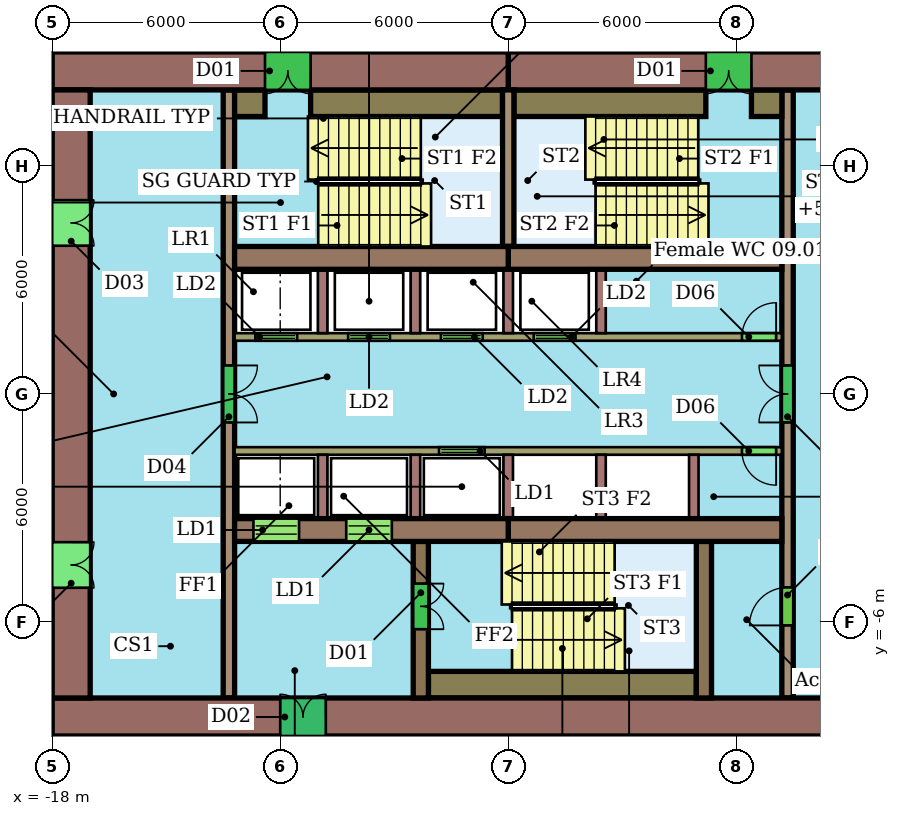
"""IFC4 building model, lengths in metres.
Left out: names, types, materials, properties, quantities, classifications, styles, units other than length and angle.
Written with IfcOpenShell. Run it as: python <this file> out.ifc"""

import sys

from ifc_helpers import new_model, si_unit, direction, frame, frame_2d, origin, place, context, subcontext, project, spatial, rectangle, extrude, element, fill, save


model = new_model("IFC4")
c1 = context("Model", 3, precision=1e-05, world=origin(), true_north=direction((0.0, 1.0)))
c2 = subcontext(c1, "Body", "Model", "MODEL_VIEW")
j1 = project(units=[si_unit("LENGTHUNIT", "METRE"), si_unit("PLANEANGLEUNIT", "RADIAN")], contexts=[c1])
p1 = place(None, origin())
s1 = spatial("IfcSite", under=j1, at=p1, CompositionType="ELEMENT")
p2 = place(p1, origin())
s2 = spatial("IfcBuilding", under=s1, at=p2, CompositionType="ELEMENT")
p3 = place(p2, frame((0.0, 0.0, 50.8)))
s3 = spatial("IfcBuildingStorey", under=s2, at=p3, CompositionType="ELEMENT", Elevation=50.8)
p4 = place(p3, frame((6.0, 8.5, 0.0), z_axis=(0.0, 0.0, 1.0), x_axis=(-1.0, 0.0, 0.0)))
e1 = element("IfcWall", 1, at=p4, inside=s3, PredefinedType="SHEAR", context=c2, shape_type="SweptSolid", body=[
    extrude(rectangle(XDim=12.0, YDim=1.0, at=frame_2d((6.0, 0.0))), origin(), (0.0, 0.0, 1.0), 3.4),
])
p5 = place(p4, frame((5.6, 0.0, 0.0)))
e2 = element("IfcOpeningElement", 2, at=p5, cuts=e1, PredefinedType="OPENING", context=c2, shape_type="SweptSolid", body=[
    extrude(rectangle(XDim=1.2, YDim=2.1, at=frame_2d((0.6, 1.05))), frame((0.0, 0.51, 0.0), z_axis=(0.0, -1.0, 0.0), x_axis=(1.0, 0.0, 0.0)), (0.0, 0.0, 1.0), 1.02),
])
p6 = place(p3, frame((-6.0, 8.5, 0.0), z_axis=(0.0, 0.0, 1.0), x_axis=(-1.0, 0.0, 0.0)))
e3 = element("IfcWall", 3, at=p6, inside=s3, PredefinedType="SHEAR", context=c2, shape_type="SweptSolid", body=[
    extrude(rectangle(XDim=12.0, YDim=1.0, at=frame_2d((6.0, 0.0))), origin(), (0.0, 0.0, 1.0), 3.4),
])
p7 = place(p6, frame((5.2, 0.0, 0.0)))
e4 = element("IfcOpeningElement", 4, at=p7, cuts=e3, PredefinedType="OPENING", context=c2, shape_type="SweptSolid", body=[
    extrude(rectangle(XDim=1.2, YDim=2.1, at=frame_2d((0.6, 1.05))), frame((0.0, 0.51, 0.0), z_axis=(0.0, -1.0, 0.0), x_axis=(1.0, 0.0, 0.0)), (0.0, 0.0, 1.0), 1.02),
])
p8 = place(p3, frame((-18.0, -8.5, 0.0), z_axis=(0.0, 0.0, 1.0), x_axis=(1.0, 0.0, 0.0)))
e5 = element("IfcWall", 5, at=p8, inside=s3, PredefinedType="SHEAR", context=c2, shape_type="SweptSolid", body=[
    extrude(rectangle(XDim=24.0, YDim=1.0, at=frame_2d((12.0, 0.0))), origin(), (0.0, 0.0, 1.0), 3.4),
])
p9 = place(p8, frame((6.0, 0.0, 0.0)))
e6 = element("IfcOpeningElement", 6, at=p9, cuts=e5, PredefinedType="OPENING", context=c2, shape_type="SweptSolid", body=[
    extrude(rectangle(XDim=1.2, YDim=2.1, at=frame_2d((0.6, 1.05))), frame((0.0, 0.51, 0.0), z_axis=(0.0, -1.0, 0.0), x_axis=(1.0, 0.0, 0.0)), (0.0, 0.0, 1.0), 1.02),
])
p10 = place(p3, frame((-17.5, 8.0, 0.0), z_axis=(0.0, 0.0, 1.0), x_axis=(0.0, -1.0, 0.0)))
e7 = element("IfcWall", 7, at=p10, inside=s3, PredefinedType="SHEAR", context=c2, shape_type="SweptSolid", body=[
    extrude(rectangle(XDim=16.0, YDim=1.0, at=frame_2d((8.0, 0.0))), origin(), (0.0, 0.0, 1.0), 3.4),
])
p11 = place(p10, frame((11.9, 0.0, 0.0)))
e8 = element("IfcOpeningElement", 8, at=p11, cuts=e7, PredefinedType="OPENING", context=c2, shape_type="SweptSolid", body=[
    extrude(rectangle(XDim=1.2, YDim=2.1, at=frame_2d((0.6, 1.05))), frame((0.0, 0.51, 0.0), z_axis=(0.0, -1.0, 0.0), x_axis=(1.0, 0.0, 0.0)), (0.0, 0.0, 1.0), 1.02),
])
p12 = place(p10, frame((2.9, 0.0, 0.0)))
e9 = element("IfcOpeningElement", 9, at=p12, cuts=e7, PredefinedType="OPENING", context=c2, shape_type="SweptSolid", body=[
    extrude(rectangle(XDim=1.2, YDim=2.1, at=frame_2d((0.6, 1.05))), frame((0.0, 0.51, 0.0), z_axis=(0.0, -1.0, 0.0), x_axis=(1.0, 0.0, 0.0)), (0.0, 0.0, 1.0), 1.02),
])
for number, where, z_axis, x_axis in (
    (10, (-13.2, 3.58, 0.0), (0.0, 0.0, 1.0), (1.0, 0.0, 0.0)),
    (11, (-6.0, 3.58, 0.0), (0.0, 0.0, 1.0), (1.0, 0.0, 0.0)),
):
    element("IfcWall", number, at=place(p3, frame(where, z_axis=z_axis, x_axis=x_axis)), inside=s3, PredefinedType="SHEAR", context=c2, shape_type="SweptSolid", body=[
        extrude(rectangle(XDim=7.2, YDim=0.6, at=frame_2d((3.6, 0.0))), origin(), (0.0, 0.0, 1.0), 3.4),
    ])
p13 = place(p3, frame((-13.2, -3.58, 0.0), z_axis=(0.0, 0.0, 1.0), x_axis=(1.0, 0.0, 0.0)))
e12 = element("IfcWall", 12, at=p13, inside=s3, PredefinedType="SHEAR", context=c2, shape_type="SweptSolid", body=[
    extrude(rectangle(XDim=7.2, YDim=0.6, at=frame_2d((3.6, 0.0))), origin(), (0.0, 0.0, 1.0), 3.4),
])
p14 = place(p13, frame((0.496, 0.0, 0.0)))
e13 = element("IfcOpeningElement", 13, at=p14, cuts=e12, PredefinedType="OPENING", context=c2, shape_type="SweptSolid", body=[
    extrude(rectangle(XDim=1.2, YDim=2.1, at=frame_2d((0.6, 1.05))), frame((0.0, 0.31, 0.0), z_axis=(0.0, -1.0, 0.0), x_axis=(1.0, 0.0, 0.0)), (0.0, 0.0, 1.0), 0.62),
])
p15 = place(p13, frame((2.938, 0.0, 0.0)))
e14 = element("IfcOpeningElement", 14, at=p15, cuts=e12, PredefinedType="OPENING", context=c2, shape_type="SweptSolid", body=[
    extrude(rectangle(XDim=1.2, YDim=2.1, at=frame_2d((0.6, 1.05))), frame((0.0, 0.31, 0.0), z_axis=(0.0, -1.0, 0.0), x_axis=(1.0, 0.0, 0.0)), (0.0, 0.0, 1.0), 0.62),
])
p16 = place(p3, frame((-6.0, -3.58, 0.0), z_axis=(0.0, 0.0, 1.0), x_axis=(1.0, 0.0, 0.0)))
e15 = element("IfcWall", 15, at=p16, inside=s3, PredefinedType="SHEAR", context=c2, shape_type="SweptSolid", body=[
    extrude(rectangle(XDim=7.2, YDim=0.6, at=frame_2d((3.6, 0.0))), origin(), (0.0, 0.0, 1.0), 3.4),
])
p17 = place(p3, frame((-13.35, 8.0, 0.0), z_axis=(0.0, 0.0, 1.0), x_axis=(0.0, -1.0, 0.0)))
e16 = element("IfcWall", 16, at=p17, inside=s3, PredefinedType="SHEAR", context=c2, shape_type="SweptSolid", body=[
    extrude(rectangle(XDim=16.0, YDim=0.3, at=frame_2d((8.0, 0.0))), origin(), (0.0, 0.0, 1.0), 3.4),
])
p18 = place(p17, frame((7.25, 0.0, 0.0)))
e17 = element("IfcOpeningElement", 17, at=p18, cuts=e16, PredefinedType="OPENING", context=c2, shape_type="SweptSolid", body=[
    extrude(rectangle(XDim=1.5, YDim=2.1, at=frame_2d((0.75, 1.05))), frame((0.0, 0.16, 0.0), z_axis=(0.0, -1.0, 0.0), x_axis=(1.0, 0.0, 0.0)), (0.0, 0.0, 1.0), 0.32),
])
p19 = place(p3, frame((1.35, -8.0, 0.0), z_axis=(0.0, 0.0, 1.0), x_axis=(0.0, 1.0, 0.0)))
e18 = element("IfcWall", 18, at=p19, inside=s3, PredefinedType="SHEAR", context=c2, shape_type="SweptSolid", body=[
    extrude(rectangle(XDim=16.0, YDim=0.3, at=frame_2d((8.0, 0.0))), origin(), (0.0, 0.0, 1.0), 3.4),
])
p20 = place(p19, frame((1.91, 0.0, 0.0)))
e19 = element("IfcOpeningElement", 19, at=p20, cuts=e18, PredefinedType="OPENING", context=c2, shape_type="SweptSolid", body=[
    extrude(rectangle(XDim=1.0, YDim=2.1, at=frame_2d((0.5, 1.05))), frame((0.0, 0.16, 0.0), z_axis=(0.0, -1.0, 0.0), x_axis=(1.0, 0.0, 0.0)), (0.0, 0.0, 1.0), 0.32),
])
p21 = place(p19, frame((7.25, 0.0, 0.0)))
e20 = element("IfcOpeningElement", 20, at=p21, cuts=e18, PredefinedType="OPENING", context=c2, shape_type="SweptSolid", body=[
    extrude(rectangle(XDim=1.5, YDim=2.1, at=frame_2d((0.75, 1.05))), frame((0.0, 0.16, 0.0), z_axis=(0.0, -1.0, 0.0), x_axis=(1.0, 0.0, 0.0)), (0.0, 0.0, 1.0), 0.32),
])
p22 = place(p3, frame((-13.2, 1.5, 0.0), z_axis=(0.0, 0.0, 1.0), x_axis=(1.0, 0.0, 0.0)))
e21 = element("IfcWall", 21, at=p22, inside=s3, PredefinedType="SHEAR", context=c2, shape_type="SweptSolid", body=[
    extrude(rectangle(XDim=14.4, YDim=0.2, at=frame_2d((7.2, 0.0))), origin(), (0.0, 0.0, 1.0), 3.4),
])
p23 = place(p22, frame((0.546, 0.0, 0.0)))
e22 = element("IfcOpeningElement", 22, at=p23, cuts=e21, PredefinedType="OPENING", context=c2, shape_type="SweptSolid", body=[
    extrude(rectangle(XDim=1.1, YDim=2.1, at=frame_2d((0.55, 1.05))), frame((0.0, 0.11, 0.0), z_axis=(0.0, -1.0, 0.0), x_axis=(1.0, 0.0, 0.0)), (0.0, 0.0, 1.0), 0.22),
])
p24 = place(p22, frame((2.988, 0.0, 0.0)))
e23 = element("IfcOpeningElement", 23, at=p24, cuts=e21, PredefinedType="OPENING", context=c2, shape_type="SweptSolid", body=[
    extrude(rectangle(XDim=1.1, YDim=2.1, at=frame_2d((0.55, 1.05))), frame((0.0, 0.11, 0.0), z_axis=(0.0, -1.0, 0.0), x_axis=(1.0, 0.0, 0.0)), (0.0, 0.0, 1.0), 0.22),
])
p25 = place(p22, frame((5.429, 0.0, 0.0)))
e24 = element("IfcOpeningElement", 24, at=p25, cuts=e21, PredefinedType="OPENING", context=c2, shape_type="SweptSolid", body=[
    extrude(rectangle(XDim=1.1, YDim=2.1, at=frame_2d((0.55, 1.05))), frame((0.0, 0.11, 0.0), z_axis=(0.0, -1.0, 0.0), x_axis=(1.0, 0.0, 0.0)), (0.0, 0.0, 1.0), 0.22),
])
p26 = place(p22, frame((7.871, 0.0, 0.0)))
e25 = element("IfcOpeningElement", 25, at=p26, cuts=e21, PredefinedType="OPENING", context=c2, shape_type="SweptSolid", body=[
    extrude(rectangle(XDim=1.1, YDim=2.1, at=frame_2d((0.55, 1.05))), frame((0.0, 0.11, 0.0), z_axis=(0.0, -1.0, 0.0), x_axis=(1.0, 0.0, 0.0)), (0.0, 0.0, 1.0), 0.22),
])
p27 = place(p22, frame((13.35, 0.0, 0.0)))
e26 = element("IfcOpeningElement", 26, at=p27, cuts=e21, PredefinedType="OPENING", context=c2, shape_type="SweptSolid", body=[
    extrude(rectangle(XDim=0.9, YDim=2.1, at=frame_2d((0.45, 1.05))), frame((0.0, 0.11, 0.0), z_axis=(0.0, -1.0, 0.0), x_axis=(1.0, 0.0, 0.0)), (0.0, 0.0, 1.0), 0.22),
])
p28 = place(p3, frame((1.2, -1.5, 0.0), z_axis=(0.0, 0.0, 1.0), x_axis=(-1.0, 0.0, 0.0)))
e27 = element("IfcWall", 27, at=p28, inside=s3, PredefinedType="SHEAR", context=c2, shape_type="SweptSolid", body=[
    extrude(rectangle(XDim=14.4, YDim=0.2, at=frame_2d((7.2, 0.0))), origin(), (0.0, 0.0, 1.0), 3.4),
])
p29 = place(p28, frame((7.821, 0.0, 0.0)))
e28 = element("IfcOpeningElement", 28, at=p29, cuts=e27, PredefinedType="OPENING", context=c2, shape_type="SweptSolid", body=[
    extrude(rectangle(XDim=1.2, YDim=2.1, at=frame_2d((0.6, 1.05))), frame((0.0, 0.11, 0.0), z_axis=(0.0, -1.0, 0.0), x_axis=(1.0, 0.0, 0.0)), (0.0, 0.0, 1.0), 0.22),
])
p30 = place(p28, frame((0.15, 0.0, 0.0)))
e29 = element("IfcOpeningElement", 29, at=p30, cuts=e27, PredefinedType="OPENING", context=c2, shape_type="SweptSolid", body=[
    extrude(rectangle(XDim=0.9, YDim=2.1, at=frame_2d((0.45, 1.05))), frame((0.0, 0.11, 0.0), z_axis=(0.0, -1.0, 0.0), x_axis=(1.0, 0.0, 0.0)), (0.0, 0.0, 1.0), 0.22),
])
p31 = place(p3, frame((-8.3, -3.88, 0.0), z_axis=(0.0, 0.0, 1.0), x_axis=(0.0, -1.0, 0.0)))
e30 = element("IfcWall", 30, at=p31, inside=s3, PredefinedType="SHEAR", context=c2, shape_type="SweptSolid", body=[
    extrude(rectangle(XDim=4.12, YDim=0.4, at=frame_2d((2.06, 0.0))), origin(), (0.0, 0.0, 1.0), 3.4),
])
p32 = place(p31, frame((1.11, 0.0, 0.0)))
e31 = element("IfcOpeningElement", 31, at=p32, cuts=e30, PredefinedType="OPENING", context=c2, shape_type="SweptSolid", body=[
    extrude(rectangle(XDim=1.2, YDim=2.1, at=frame_2d((0.6, 1.05))), frame((0.0, 0.21, 0.0), z_axis=(0.0, -1.0, 0.0), x_axis=(1.0, 0.0, 0.0)), (0.0, 0.0, 1.0), 0.42),
])
p33 = place(p3, frame((-0.85, -3.88, 0.0), z_axis=(0.0, 0.0, 1.0), x_axis=(0.0, -1.0, 0.0)))
e32 = element("IfcWall", 32, at=p33, inside=s3, PredefinedType="SHEAR", context=c2, shape_type="SweptSolid", body=[
    extrude(rectangle(XDim=4.12, YDim=0.4, at=frame_2d((2.06, 0.0))), origin(), (0.0, 0.0, 1.0), 3.4),
])
p34 = place(p3, frame((-6.0, 3.88, 0.0), z_axis=(0.0, 0.0, 1.0), x_axis=(0.0, 1.0, 0.0)))
e33 = element("IfcWall", 33, at=p34, inside=s3, PredefinedType="SHEAR", context=c2, shape_type="SweptSolid", body=[
    extrude(rectangle(XDim=4.12, YDim=0.3, at=frame_2d((2.06, 0.0))), origin(), (0.0, 0.0, 1.0), 3.4),
])
p35 = place(p3, frame((-13.2, 7.65, 0.0), z_axis=(0.0, 0.0, 1.0), x_axis=(1.0, 0.0, 0.0)))
e34 = element("IfcWall", 34, at=p35, inside=s3, PredefinedType="SHEAR", context=c2, shape_type="SweptSolid", body=[
    extrude(rectangle(XDim=0.8, YDim=0.7, at=frame_2d((0.4, 0.0))), origin(), (0.0, 0.0, 1.0), 3.4),
])
for number, where, z_axis, x_axis in (
    (35, (-11.2, 7.65, 0.0), (0.0, 0.0, 1.0), (1.0, 0.0, 0.0)),
    (36, (-5.85, 7.65, 0.0), (0.0, 0.0, 1.0), (1.0, 0.0, 0.0)),
):
    element("IfcWall", number, at=place(p3, frame(where, z_axis=z_axis, x_axis=x_axis)), inside=s3, PredefinedType="SHEAR", context=c2, shape_type="SweptSolid", body=[
        extrude(rectangle(XDim=5.05, YDim=0.7, at=frame_2d((2.525, 0.0))), origin(), (0.0, 0.0, 1.0), 3.4),
    ])
p36 = place(p3, frame((0.4, 7.65, 0.0), z_axis=(0.0, 0.0, 1.0), x_axis=(1.0, 0.0, 0.0)))
e37 = element("IfcWall", 37, at=p36, inside=s3, PredefinedType="SHEAR", context=c2, shape_type="SweptSolid", body=[
    extrude(rectangle(XDim=0.8, YDim=0.7, at=frame_2d((0.4, 0.0))), origin(), (0.0, 0.0, 1.0), 3.4),
])
p37 = place(p3, frame((-8.1, -7.65, 0.0), z_axis=(0.0, 0.0, 1.0), x_axis=(1.0, 0.0, 0.0)))
e38 = element("IfcWall", 38, at=p37, inside=s3, PredefinedType="SHEAR", context=c2, shape_type="SweptSolid", body=[
    extrude(rectangle(XDim=7.05, YDim=0.7, at=frame_2d((3.525, 0.0))), origin(), (0.0, 0.0, 1.0), 3.4),
])
for number, where, z_axis, x_axis in (
    (39, (-10.883, 1.6, 0.0), (0.0, 0.0, 1.0), (0.0, 1.0, 0.0)),
    (40, (-8.442, 1.6, 0.0), (0.0, 0.0, 1.0), (0.0, 1.0, 0.0)),
    (41, (-6.0, 1.6, 0.0), (0.0, 0.0, 1.0), (0.0, 1.0, 0.0)),
    (42, (-3.558, 1.6, 0.0), (0.0, 0.0, 1.0), (0.0, 1.0, 0.0)),
    (43, (-10.883, -1.6, 0.0), (0.0, 0.0, 1.0), (0.0, -1.0, 0.0)),
    (44, (-8.442, -1.6, 0.0), (0.0, 0.0, 1.0), (0.0, -1.0, 0.0)),
    (45, (-6.0, -1.6, 0.0), (0.0, 0.0, 1.0), (0.0, -1.0, 0.0)),
    (46, (-3.558, -1.6, 0.0), (0.0, 0.0, 1.0), (0.0, -1.0, 0.0)),
    (47, (-1.117, -1.6, 0.0), (0.0, 0.0, 1.0), (0.0, -1.0, 0.0)),
):
    element("IfcWall", number, at=place(p3, frame(where, z_axis=z_axis, x_axis=x_axis)), inside=s3, PredefinedType="SHEAR", context=c2, shape_type="SweptSolid", body=[
        extrude(rectangle(XDim=1.68, YDim=0.25, at=frame_2d((0.84, 0.0))), origin(), (0.0, 0.0, 1.0), 3.4),
    ])
p38 = place(p5, origin())
e48 = element("IfcDoor", 48, at=p38, inside=s3, OperationType="DOUBLE_DOOR_SINGLE_SWING", PredefinedType="NOTDEFINED", context=c2, shape_type="SweptSolid", body=[
    extrude(rectangle(XDim=1.2, YDim=2.1, at=frame_2d((0.6, 1.05))), frame((0.0, 0.025, 0.0), z_axis=(0.0, -1.0, 0.0), x_axis=(1.0, 0.0, 0.0)), (0.0, 0.0, 1.0), 0.05),
])
fill(e2, e48)
p39 = place(p7, origin())
e49 = element("IfcDoor", 49, at=p39, inside=s3, OperationType="DOUBLE_DOOR_SINGLE_SWING", PredefinedType="NOTDEFINED", context=c2, shape_type="SweptSolid", body=[
    extrude(rectangle(XDim=1.2, YDim=2.1, at=frame_2d((0.6, 1.05))), frame((0.0, 0.025, 0.0), z_axis=(0.0, -1.0, 0.0), x_axis=(1.0, 0.0, 0.0)), (0.0, 0.0, 1.0), 0.05),
])
fill(e4, e49)
p40 = place(p9, origin())
e50 = element("IfcDoor", 50, at=p40, inside=s3, OperationType="DOUBLE_DOOR_SINGLE_SWING", PredefinedType="NOTDEFINED", context=c2, shape_type="SweptSolid", body=[
    extrude(rectangle(XDim=1.2, YDim=2.1, at=frame_2d((0.6, 1.05))), frame((0.0, 0.025, 0.0), z_axis=(0.0, -1.0, 0.0), x_axis=(1.0, 0.0, 0.0)), (0.0, 0.0, 1.0), 0.05),
])
fill(e6, e50)
p41 = place(p11, origin())
e51 = element("IfcDoor", 51, at=p41, inside=s3, OperationType="DOUBLE_DOOR_SINGLE_SWING", PredefinedType="NOTDEFINED", context=c2, shape_type="SweptSolid", body=[
    extrude(rectangle(XDim=1.2, YDim=2.1, at=frame_2d((0.6, 1.05))), frame((0.0, 0.025, 0.0), z_axis=(0.0, -1.0, 0.0), x_axis=(1.0, 0.0, 0.0)), (0.0, 0.0, 1.0), 0.05),
])
fill(e8, e51)
p42 = place(p12, origin())
e52 = element("IfcDoor", 52, at=p42, inside=s3, OperationType="DOUBLE_DOOR_SINGLE_SWING", PredefinedType="NOTDEFINED", context=c2, shape_type="SweptSolid", body=[
    extrude(rectangle(XDim=1.2, YDim=2.1, at=frame_2d((0.6, 1.05))), frame((0.0, 0.025, 0.0), z_axis=(0.0, -1.0, 0.0), x_axis=(1.0, 0.0, 0.0)), (0.0, 0.0, 1.0), 0.05),
])
fill(e9, e52)
p43 = place(p14, origin())
e53 = element("IfcDoor", 53, at=p43, inside=s3, OperationType="DOUBLE_DOOR_SLIDING", PredefinedType="NOTDEFINED", context=c2, shape_type="SweptSolid", body=[
    extrude(rectangle(XDim=1.2, YDim=2.1, at=frame_2d((0.6, 1.05))), frame((0.0, 0.025, 0.0), z_axis=(0.0, -1.0, 0.0), x_axis=(1.0, 0.0, 0.0)), (0.0, 0.0, 1.0), 0.05),
])
fill(e13, e53)
p44 = place(p15, origin())
e54 = element("IfcDoor", 54, at=p44, inside=s3, OperationType="DOUBLE_DOOR_SLIDING", PredefinedType="NOTDEFINED", context=c2, shape_type="SweptSolid", body=[
    extrude(rectangle(XDim=1.2, YDim=2.1, at=frame_2d((0.6, 1.05))), frame((0.0, 0.025, 0.0), z_axis=(0.0, -1.0, 0.0), x_axis=(1.0, 0.0, 0.0)), (0.0, 0.0, 1.0), 0.05),
])
fill(e14, e54)
p45 = place(p18, origin())
e55 = element("IfcDoor", 55, at=p45, inside=s3, OperationType="DOUBLE_DOOR_SINGLE_SWING", PredefinedType="NOTDEFINED", context=c2, shape_type="SweptSolid", body=[
    extrude(rectangle(XDim=1.5, YDim=2.1, at=frame_2d((0.75, 1.05))), frame((0.0, 0.025, 0.0), z_axis=(0.0, -1.0, 0.0), x_axis=(1.0, 0.0, 0.0)), (0.0, 0.0, 1.0), 0.05),
])
fill(e17, e55)
p46 = place(p20, origin())
e56 = element("IfcDoor", 56, at=p46, inside=s3, OperationType="SINGLE_SWING_LEFT", PredefinedType="NOTDEFINED", context=c2, shape_type="SweptSolid", body=[
    extrude(rectangle(XDim=1.0, YDim=2.1, at=frame_2d((0.5, 1.05))), frame((0.0, 0.025, 0.0), z_axis=(0.0, -1.0, 0.0), x_axis=(1.0, 0.0, 0.0)), (0.0, 0.0, 1.0), 0.05),
])
fill(e19, e56)
p47 = place(p21, origin())
e57 = element("IfcDoor", 57, at=p47, inside=s3, OperationType="DOUBLE_DOOR_SINGLE_SWING", PredefinedType="NOTDEFINED", context=c2, shape_type="SweptSolid", body=[
    extrude(rectangle(XDim=1.5, YDim=2.1, at=frame_2d((0.75, 1.05))), frame((0.0, 0.025, 0.0), z_axis=(0.0, -1.0, 0.0), x_axis=(1.0, 0.0, 0.0)), (0.0, 0.0, 1.0), 0.05),
])
fill(e20, e57)
p48 = place(p23, origin())
e58 = element("IfcDoor", 58, at=p48, inside=s3, OperationType="DOUBLE_DOOR_SLIDING", PredefinedType="NOTDEFINED", context=c2, shape_type="SweptSolid", body=[
    extrude(rectangle(XDim=1.1, YDim=2.1, at=frame_2d((0.55, 1.05))), frame((0.0, 0.025, 0.0), z_axis=(0.0, -1.0, 0.0), x_axis=(1.0, 0.0, 0.0)), (0.0, 0.0, 1.0), 0.05),
])
fill(e22, e58)
p49 = place(p24, origin())
e59 = element("IfcDoor", 59, at=p49, inside=s3, OperationType="DOUBLE_DOOR_SLIDING", PredefinedType="NOTDEFINED", context=c2, shape_type="SweptSolid", body=[
    extrude(rectangle(XDim=1.1, YDim=2.1, at=frame_2d((0.55, 1.05))), frame((0.0, 0.025, 0.0), z_axis=(0.0, -1.0, 0.0), x_axis=(1.0, 0.0, 0.0)), (0.0, 0.0, 1.0), 0.05),
])
fill(e23, e59)
p50 = place(p25, origin())
e60 = element("IfcDoor", 60, at=p50, inside=s3, OperationType="DOUBLE_DOOR_SLIDING", PredefinedType="NOTDEFINED", context=c2, shape_type="SweptSolid", body=[
    extrude(rectangle(XDim=1.1, YDim=2.1, at=frame_2d((0.55, 1.05))), frame((0.0, 0.025, 0.0), z_axis=(0.0, -1.0, 0.0), x_axis=(1.0, 0.0, 0.0)), (0.0, 0.0, 1.0), 0.05),
])
fill(e24, e60)
p51 = place(p26, origin())
e61 = element("IfcDoor", 61, at=p51, inside=s3, OperationType="DOUBLE_DOOR_SLIDING", PredefinedType="NOTDEFINED", context=c2, shape_type="SweptSolid", body=[
    extrude(rectangle(XDim=1.1, YDim=2.1, at=frame_2d((0.55, 1.05))), frame((0.0, 0.025, 0.0), z_axis=(0.0, -1.0, 0.0), x_axis=(1.0, 0.0, 0.0)), (0.0, 0.0, 1.0), 0.05),
])
fill(e25, e61)
p52 = place(p27, origin())
e62 = element("IfcDoor", 62, at=p52, inside=s3, OperationType="SINGLE_SWING_RIGHT", PredefinedType="NOTDEFINED", context=c2, shape_type="SweptSolid", body=[
    extrude(rectangle(XDim=0.9, YDim=2.1, at=frame_2d((0.45, 1.05))), frame((0.0, 0.025, 0.0), z_axis=(0.0, -1.0, 0.0), x_axis=(1.0, 0.0, 0.0)), (0.0, 0.0, 1.0), 0.05),
])
fill(e26, e62)
p53 = place(p29, origin())
e63 = element("IfcDoor", 63, at=p53, inside=s3, OperationType="DOUBLE_DOOR_SLIDING", PredefinedType="NOTDEFINED", context=c2, shape_type="SweptSolid", body=[
    extrude(rectangle(XDim=1.2, YDim=2.1, at=frame_2d((0.6, 1.05))), frame((0.0, 0.025, 0.0), z_axis=(0.0, -1.0, 0.0), x_axis=(1.0, 0.0, 0.0)), (0.0, 0.0, 1.0), 0.05),
])
fill(e28, e63)
p54 = place(p30, origin())
e64 = element("IfcDoor", 64, at=p54, inside=s3, OperationType="SINGLE_SWING_LEFT", PredefinedType="NOTDEFINED", context=c2, shape_type="SweptSolid", body=[
    extrude(rectangle(XDim=0.9, YDim=2.1, at=frame_2d((0.45, 1.05))), frame((0.0, 0.025, 0.0), z_axis=(0.0, -1.0, 0.0), x_axis=(1.0, 0.0, 0.0)), (0.0, 0.0, 1.0), 0.05),
])
fill(e29, e64)
p55 = place(p32, origin())
e65 = element("IfcDoor", 65, at=p55, inside=s3, OperationType="DOUBLE_DOOR_SINGLE_SWING", PredefinedType="NOTDEFINED", context=c2, shape_type="SweptSolid", body=[
    extrude(rectangle(XDim=1.2, YDim=2.1, at=frame_2d((0.6, 1.05))), frame((0.0, 0.025, 0.0), z_axis=(0.0, -1.0, 0.0), x_axis=(1.0, 0.0, 0.0)), (0.0, 0.0, 1.0), 0.05),
])
fill(e31, e65)
save(model, sys.argv[1])
